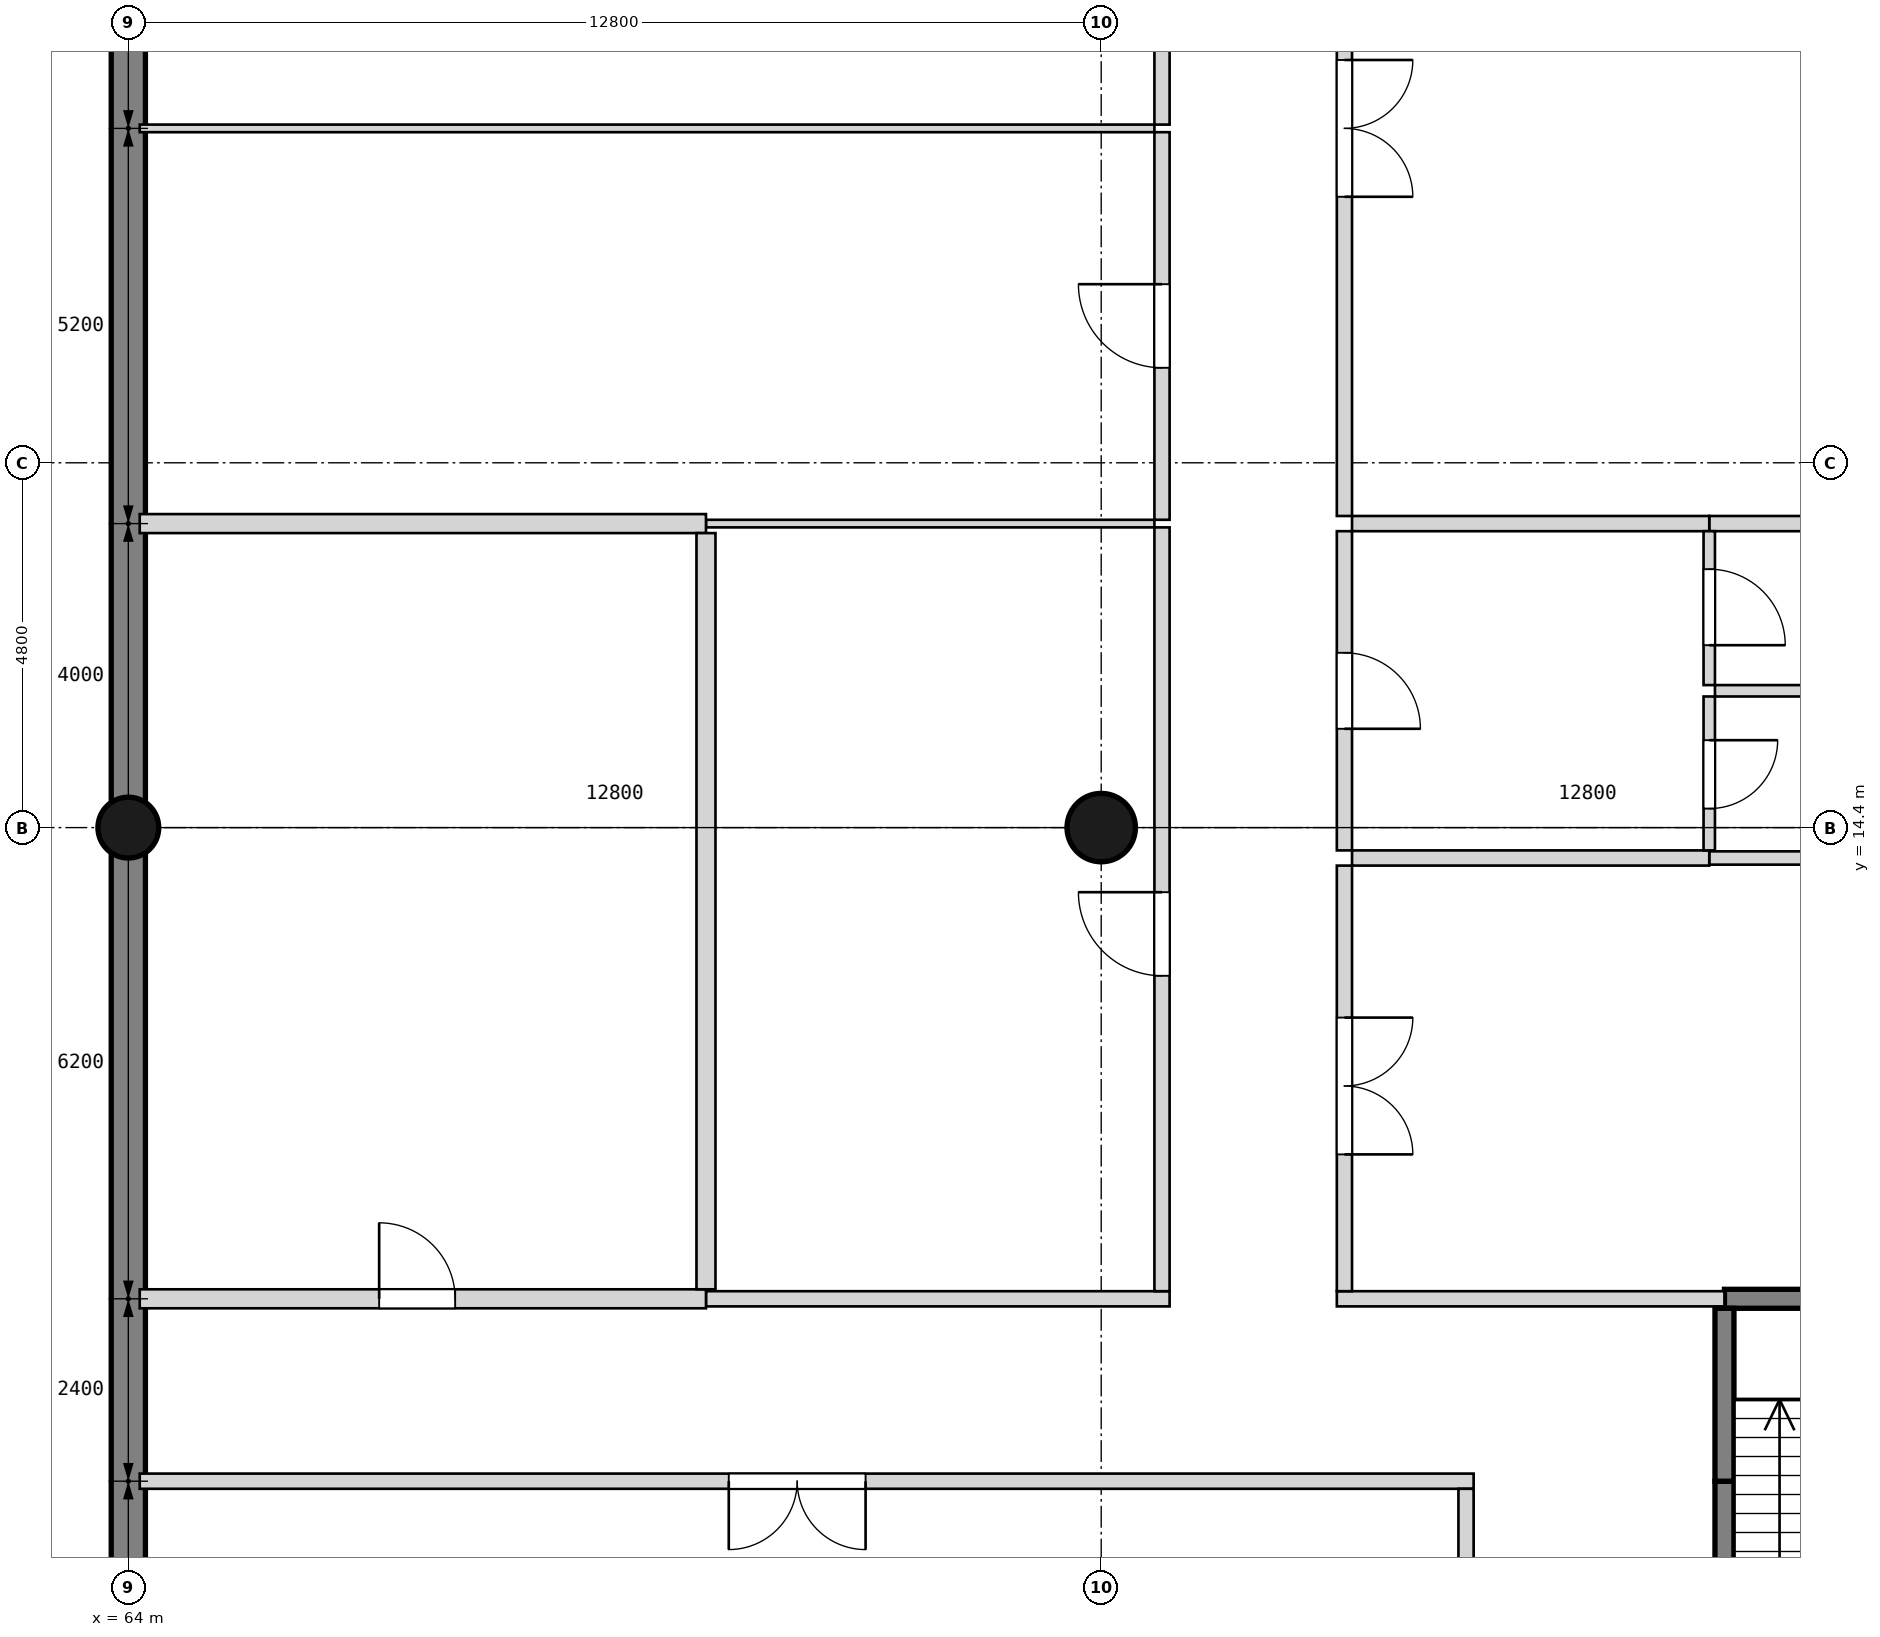
"""IFC4 building model, lengths in metres.
Left out: names, types, materials, properties, quantities, classifications, styles, units other than length and angle.
Written with IfcOpenShell. Run it as: python <this file> out.ifc"""

import sys

from ifc_helpers import new_model, si_unit, direction, frame, frame_2d, origin, origin_2d, place, context, subcontext, project, spatial, rectangle, circle, extrude, element, fill, save


model = new_model("IFC4")
c1 = context("Model", 3, precision=1e-05, world=origin(), true_north=direction((0.0, 1.0)))
c2 = subcontext(c1, "Body", "Model", "MODEL_VIEW")
j1 = project(units=[si_unit("LENGTHUNIT", "METRE"), si_unit("PLANEANGLEUNIT", "RADIAN")], contexts=[c1])
p1 = place(None, origin())
s1 = spatial("IfcSite", under=j1, at=p1, CompositionType="ELEMENT")
p2 = place(p1, origin())
s2 = spatial("IfcBuilding", under=s1, at=p2, CompositionType="ELEMENT")
p3 = place(p2, frame((0.0, 0.0, -4.8)))
s3 = spatial("IfcBuildingStorey", under=s2, at=p3, CompositionType="ELEMENT", Elevation=-4.8)
p4 = place(p3, frame((64.0, -0.225, 0.0), z_axis=(0.0, 0.0, 1.0), x_axis=(0.0, 1.0, 0.0)))
e1 = element("IfcWall", 1, at=p4, inside=s3, PredefinedType="SOLIDWALL", context=c2, shape_type="SweptSolid", body=[
    extrude(rectangle(XDim=33.6, YDim=0.45, at=frame_2d((16.8, 0.0))), origin(), (0.0, 0.0, 1.0), 4.8),
])
p5 = place(p3, frame((76.8, 14.4, 0.0), z_axis=(0.0, 0.0, 1.0), x_axis=(1.0, 0.0, 0.0)))
e2 = element("IfcColumn", 2, at=p5, inside=s3, PredefinedType="COLUMN", context=c2, shape_type="SweptSolid", body=[
    extrude(circle(Radius=0.45, at=origin_2d()), origin(), (0.0, 0.0, 1.0), 4.8),
])
p6 = place(p3, frame((64.0, 14.4, 0.0), z_axis=(0.0, 0.0, 1.0), x_axis=(1.0, 0.0, 0.0)))
e3 = element("IfcColumn", 3, at=p6, inside=s3, PredefinedType="COLUMN", context=c2, shape_type="SweptSolid", body=[
    extrude(circle(Radius=0.4, at=origin_2d()), origin(), (0.0, 0.0, 1.0), 4.8),
])
p7 = place(p3, frame((81.7, 5.8, 0.0), z_axis=(0.0, 0.0, 1.0), x_axis=(-1.0, 0.0, 0.0)))
e4 = element("IfcWall", 4, at=p7, inside=s3, PredefinedType="PARTITIONING", context=c2, shape_type="SweptSolid", body=[
    extrude(rectangle(XDim=17.55, YDim=0.2, at=frame_2d((8.775, 0.0))), origin(), (0.0, 0.0, 1.0), 4.5),
])
p8 = place(p7, frame((8.0, 0.0, 0.0)))
e5 = element("IfcOpeningElement", 5, at=p8, cuts=e4, PredefinedType="OPENING", context=c2, shape_type="SweptSolid", body=[
    extrude(rectangle(XDim=1.8, YDim=2.1, at=frame_2d((0.9, 1.05))), frame((0.0, 0.11, 0.0), z_axis=(0.0, -1.0, 0.0), x_axis=(1.0, 0.0, 0.0)), (0.0, 0.0, 1.0), 0.22),
])
p9 = place(p3, frame((88.6, 8.2, 0.0), z_axis=(0.0, 0.0, 1.0), x_axis=(-1.0, 0.0, 0.0)))
e6 = element("IfcWall", 6, at=p9, inside=s3, PredefinedType="SHEAR", context=c2, shape_type="SweptSolid", body=[
    extrude(rectangle(XDim=3.6, YDim=0.25, at=frame_2d((1.8, 0.0))), origin(), (0.0, 0.0, 1.0), 4.5),
])
p10 = place(p3, frame((85.0, 8.2, 0.0), z_axis=(0.0, 0.0, 1.0), x_axis=(-1.0, 0.0, 0.0)))
e7 = element("IfcWall", 7, at=p10, inside=s3, PredefinedType="PARTITIONING", context=c2, shape_type="SweptSolid", body=[
    extrude(rectangle(XDim=5.1, YDim=0.2, at=frame_2d((2.55, 0.0))), origin(), (0.0, 0.0, 1.0), 4.5),
])
p11 = place(p3, frame((77.7, 8.2, 0.0), z_axis=(0.0, 0.0, 1.0), x_axis=(-1.0, 0.0, 0.0)))
e8 = element("IfcWall", 8, at=p11, inside=s3, PredefinedType="PARTITIONING", context=c2, shape_type="SweptSolid", body=[
    extrude(rectangle(XDim=6.1, YDim=0.2, at=frame_2d((3.05, 0.0))), origin(), (0.0, 0.0, 1.0), 4.5),
])
p12 = place(p3, frame((71.6, 8.2, 0.0), z_axis=(0.0, 0.0, 1.0), x_axis=(-1.0, 0.0, 0.0)))
e9 = element("IfcWall", 9, at=p12, inside=s3, PredefinedType="PARTITIONING", context=c2, shape_type="SweptSolid", body=[
    extrude(rectangle(XDim=7.45, YDim=0.25, at=frame_2d((3.725, 0.0))), origin(), (0.0, 0.0, 1.0), 4.5),
])
p13 = place(p12, frame((3.3, 0.0, 0.0)))
e10 = element("IfcOpeningElement", 10, at=p13, cuts=e9, PredefinedType="OPENING", context=c2, shape_type="SweptSolid", body=[
    extrude(rectangle(XDim=1.0, YDim=2.1, at=frame_2d((0.5, 1.05))), frame((0.0, 0.135, 0.0), z_axis=(0.0, -1.0, 0.0), x_axis=(1.0, 0.0, 0.0)), (0.0, 0.0, 1.0), 0.27),
])
p14 = place(p3, frame((89.38, 14.0, 0.0), z_axis=(0.0, 0.0, 1.0), x_axis=(-1.0, 0.0, 0.0)))
e11 = element("IfcWall", 11, at=p14, inside=s3, PredefinedType="PARTITIONING", context=c2, shape_type="SweptSolid", body=[
    extrude(rectangle(XDim=4.58, YDim=0.175, at=frame_2d((2.29, 0.0))), origin(), (0.0, 0.0, 1.0), 4.5),
])
p15 = place(p3, frame((84.8, 14.0, 0.0), z_axis=(0.0, 0.0, 1.0), x_axis=(-1.0, 0.0, 0.0)))
e12 = element("IfcWall", 12, at=p15, inside=s3, PredefinedType="PARTITIONING", context=c2, shape_type="SweptSolid", body=[
    extrude(rectangle(XDim=4.7, YDim=0.2, at=frame_2d((2.35, 0.0))), origin(), (0.0, 0.0, 1.0), 4.5),
])
p16 = place(p3, frame((89.45, 16.2, 0.0), z_axis=(0.0, 0.0, 1.0), x_axis=(-1.0, 0.0, 0.0)))
e13 = element("IfcWall", 13, at=p16, inside=s3, PredefinedType="PARTITIONING", context=c2, shape_type="SweptSolid", body=[
    extrude(rectangle(XDim=4.575, YDim=0.15, at=frame_2d((2.288, 0.0))), origin(), (0.0, 0.0, 1.0), 4.5),
])
p17 = place(p3, frame((89.45, 18.4, 0.0), z_axis=(0.0, 0.0, 1.0), x_axis=(-1.0, 0.0, 0.0)))
e14 = element("IfcWall", 14, at=p17, inside=s3, PredefinedType="PARTITIONING", context=c2, shape_type="SweptSolid", body=[
    extrude(rectangle(XDim=4.65, YDim=0.2, at=frame_2d((2.325, 0.0))), origin(), (0.0, 0.0, 1.0), 4.5),
])
p18 = place(p3, frame((84.8, 18.4, 0.0), z_axis=(0.0, 0.0, 1.0), x_axis=(-1.0, 0.0, 0.0)))
e15 = element("IfcWall", 15, at=p18, inside=s3, PredefinedType="PARTITIONING", context=c2, shape_type="SweptSolid", body=[
    extrude(rectangle(XDim=4.7, YDim=0.2, at=frame_2d((2.35, 0.0))), origin(), (0.0, 0.0, 1.0), 4.5),
])
p19 = place(p3, frame((77.5, 18.4, 0.0), z_axis=(0.0, 0.0, 1.0), x_axis=(-1.0, 0.0, 0.0)))
e16 = element("IfcWall", 16, at=p19, inside=s3, PredefinedType="PARTITIONING", context=c2, shape_type="SweptSolid", body=[
    extrude(rectangle(XDim=5.9, YDim=0.1, at=frame_2d((2.95, 0.0))), origin(), (0.0, 0.0, 1.0), 4.5),
])
p20 = place(p3, frame((71.6, 18.4, 0.0), z_axis=(0.0, 0.0, 1.0), x_axis=(-1.0, 0.0, 0.0)))
e17 = element("IfcWall", 17, at=p20, inside=s3, PredefinedType="PARTITIONING", context=c2, shape_type="SweptSolid", body=[
    extrude(rectangle(XDim=7.45, YDim=0.25, at=frame_2d((3.725, 0.0))), origin(), (0.0, 0.0, 1.0), 4.5),
])
p21 = place(p3, frame((77.5, 23.6, 0.0), z_axis=(0.0, 0.0, 1.0), x_axis=(-1.0, 0.0, 0.0)))
e18 = element("IfcWall", 18, at=p21, inside=s3, PredefinedType="PARTITIONING", context=c2, shape_type="SweptSolid", body=[
    extrude(rectangle(XDim=13.35, YDim=0.1, at=frame_2d((6.675, 0.0))), origin(), (0.0, 0.0, 1.0), 4.5),
])
p22 = place(p3, frame((85.0, 2.325, 0.0), z_axis=(0.0, 0.0, 1.0), x_axis=(0.0, 1.0, 0.0)))
e19 = element("IfcWall", 19, at=p22, inside=s3, PredefinedType="SHEAR", context=c2, shape_type="SweptSolid", body=[
    extrude(rectangle(XDim=3.475, YDim=0.25, at=frame_2d((1.738, 0.0))), origin(), (0.0, 0.0, 1.0), 4.5),
])
p23 = place(p22, frame((0.105, 0.0, 0.0)))
e20 = element("IfcOpeningElement", 20, at=p23, cuts=e19, PredefinedType="OPENING", context=c2, shape_type="SweptSolid", body=[
    extrude(rectangle(XDim=1.2, YDim=2.1, at=frame_2d((0.6, 1.05))), frame((0.0, 0.135, 0.0), z_axis=(0.0, -1.0, 0.0), x_axis=(1.0, 0.0, 0.0)), (0.0, 0.0, 1.0), 0.27),
])
p24 = place(p3, frame((85.0, 5.8, 0.0), z_axis=(0.0, 0.0, 1.0), x_axis=(0.0, 1.0, 0.0)))
e21 = element("IfcWall", 21, at=p24, inside=s3, PredefinedType="SHEAR", context=c2, shape_type="SweptSolid", body=[
    extrude(rectangle(XDim=2.275, YDim=0.25, at=frame_2d((1.137, 0.0))), origin(), (0.0, 0.0, 1.0), 4.5),
])
p25 = place(p3, frame((84.8, 14.1, 0.0), z_axis=(0.0, 0.0, 1.0), x_axis=(0.0, 1.0, 0.0)))
e22 = element("IfcWall", 22, at=p25, inside=s3, PredefinedType="PARTITIONING", context=c2, shape_type="SweptSolid", body=[
    extrude(rectangle(XDim=2.025, YDim=0.15, at=frame_2d((1.012, 0.0))), origin(), (0.0, 0.0, 1.0), 4.5),
])
p26 = place(p25, frame((0.55, 0.0, 0.0)))
e23 = element("IfcOpeningElement", 23, at=p26, cuts=e22, PredefinedType="OPENING", context=c2, shape_type="SweptSolid", body=[
    extrude(rectangle(XDim=0.9, YDim=2.1, at=frame_2d((0.45, 1.05))), frame((0.0, 0.085, 0.0), z_axis=(0.0, -1.0, 0.0), x_axis=(1.0, 0.0, 0.0)), (0.0, 0.0, 1.0), 0.17),
])
p27 = place(p3, frame((84.8, 16.275, 0.0), z_axis=(0.0, 0.0, 1.0), x_axis=(0.0, 1.0, 0.0)))
e24 = element("IfcWall", 24, at=p27, inside=s3, PredefinedType="PARTITIONING", context=c2, shape_type="SweptSolid", body=[
    extrude(rectangle(XDim=2.025, YDim=0.15, at=frame_2d((1.013, 0.0))), origin(), (0.0, 0.0, 1.0), 4.5),
])
p28 = place(p27, frame((0.525, 0.0, 0.0)))
e25 = element("IfcOpeningElement", 25, at=p28, cuts=e24, PredefinedType="OPENING", context=c2, shape_type="SweptSolid", body=[
    extrude(rectangle(XDim=1.0, YDim=2.1, at=frame_2d((0.5, 1.05))), frame((0.0, 0.085, 0.0), z_axis=(0.0, -1.0, 0.0), x_axis=(1.0, 0.0, 0.0)), (0.0, 0.0, 1.0), 0.17),
])
p29 = place(p3, frame((81.6, 0.15, 0.0), z_axis=(0.0, 0.0, 1.0), x_axis=(0.0, 1.0, 0.0)))
e26 = element("IfcWall", 26, at=p29, inside=s3, PredefinedType="PARTITIONING", context=c2, shape_type="SweptSolid", body=[
    extrude(rectangle(XDim=5.55, YDim=0.2, at=frame_2d((2.775, 0.0))), origin(), (0.0, 0.0, 1.0), 4.5),
])
p30 = place(p3, frame((80.0, 8.3, 0.0), z_axis=(0.0, 0.0, 1.0), x_axis=(0.0, 1.0, 0.0)))
e27 = element("IfcWall", 27, at=p30, inside=s3, PredefinedType="PARTITIONING", context=c2, shape_type="SweptSolid", body=[
    extrude(rectangle(XDim=5.6, YDim=0.2, at=frame_2d((2.8, 0.0))), origin(), (0.0, 0.0, 1.0), 3.6),
])
p31 = place(p30, frame((1.8, 0.0, 0.0)))
e28 = element("IfcOpeningElement", 28, at=p31, cuts=e27, PredefinedType="OPENING", context=c2, shape_type="SweptSolid", body=[
    extrude(rectangle(XDim=1.8, YDim=2.1, at=frame_2d((0.9, 1.05))), frame((0.0, 0.11, 0.0), z_axis=(0.0, -1.0, 0.0), x_axis=(1.0, 0.0, 0.0)), (0.0, 0.0, 1.0), 0.22),
])
p32 = place(p3, frame((80.0, 14.1, 0.0), z_axis=(0.0, 0.0, 1.0), x_axis=(0.0, 1.0, 0.0)))
e29 = element("IfcWall", 29, at=p32, inside=s3, PredefinedType="PARTITIONING", context=c2, shape_type="SweptSolid", body=[
    extrude(rectangle(XDim=4.2, YDim=0.2, at=frame_2d((2.1, 0.0))), origin(), (0.0, 0.0, 1.0), 3.6),
])
p33 = place(p32, frame((1.6, 0.0, 0.0)))
e30 = element("IfcOpeningElement", 30, at=p33, cuts=e29, PredefinedType="OPENING", context=c2, shape_type="SweptSolid", body=[
    extrude(rectangle(XDim=1.0, YDim=2.1, at=frame_2d((0.5, 1.05))), frame((0.0, 0.11, 0.0), z_axis=(0.0, -1.0, 0.0), x_axis=(1.0, 0.0, 0.0)), (0.0, 0.0, 1.0), 0.22),
])
p34 = place(p3, frame((80.0, 18.5, 0.0), z_axis=(0.0, 0.0, 1.0), x_axis=(0.0, 1.0, 0.0)))
e31 = element("IfcWall", 31, at=p34, inside=s3, PredefinedType="PARTITIONING", context=c2, shape_type="SweptSolid", body=[
    extrude(rectangle(XDim=10.2, YDim=0.2, at=frame_2d((5.1, 0.0))), origin(), (0.0, 0.0, 1.0), 3.6),
])
p35 = place(p34, frame((4.2, 0.0, 0.0)))
e32 = element("IfcOpeningElement", 32, at=p35, cuts=e31, PredefinedType="OPENING", context=c2, shape_type="SweptSolid", body=[
    extrude(rectangle(XDim=1.8, YDim=2.1, at=frame_2d((0.9, 1.05))), frame((0.0, 0.11, 0.0), z_axis=(0.0, -1.0, 0.0), x_axis=(1.0, 0.0, 0.0)), (0.0, 0.0, 1.0), 0.22),
])
p36 = place(p3, frame((77.6, 8.3, 0.0), z_axis=(0.0, 0.0, 1.0), x_axis=(0.0, 1.0, 0.0)))
e33 = element("IfcWall", 33, at=p36, inside=s3, PredefinedType="PARTITIONING", context=c2, shape_type="SweptSolid", body=[
    extrude(rectangle(XDim=10.05, YDim=0.2, at=frame_2d((5.025, 0.0))), origin(), (0.0, 0.0, 1.0), 4.5),
])
p37 = place(p36, frame((4.15, 0.0, 0.0)))
e34 = element("IfcOpeningElement", 34, at=p37, cuts=e33, PredefinedType="OPENING", context=c2, shape_type="SweptSolid", body=[
    extrude(rectangle(XDim=1.1, YDim=2.1, at=frame_2d((0.55, 1.05))), frame((0.0, 0.11, 0.0), z_axis=(0.0, -1.0, 0.0), x_axis=(1.0, 0.0, 0.0)), (0.0, 0.0, 1.0), 0.22),
])
p38 = place(p3, frame((77.6, 18.45, 0.0), z_axis=(0.0, 0.0, 1.0), x_axis=(0.0, 1.0, 0.0)))
e35 = element("IfcWall", 35, at=p38, inside=s3, PredefinedType="PARTITIONING", context=c2, shape_type="SweptSolid", body=[
    extrude(rectangle(XDim=5.1, YDim=0.2, at=frame_2d((2.55, 0.0))), origin(), (0.0, 0.0, 1.0), 4.5),
])
p39 = place(p38, frame((2.0, 0.0, 0.0)))
e36 = element("IfcOpeningElement", 36, at=p39, cuts=e35, PredefinedType="OPENING", context=c2, shape_type="SweptSolid", body=[
    extrude(rectangle(XDim=1.1, YDim=2.1, at=frame_2d((0.55, 1.05))), frame((0.0, 0.11, 0.0), z_axis=(0.0, -1.0, 0.0), x_axis=(1.0, 0.0, 0.0)), (0.0, 0.0, 1.0), 0.22),
])
p40 = place(p3, frame((77.6, 23.65, 0.0), z_axis=(0.0, 0.0, 1.0), x_axis=(0.0, 1.0, 0.0)))
e37 = element("IfcWall", 37, at=p40, inside=s3, PredefinedType="PARTITIONING", context=c2, shape_type="SweptSolid", body=[
    extrude(rectangle(XDim=5.05, YDim=0.2, at=frame_2d((2.525, 0.0))), origin(), (0.0, 0.0, 1.0), 4.5),
])
p41 = place(p3, frame((71.6, 8.325, 0.0), z_axis=(0.0, 0.0, 1.0), x_axis=(0.0, 1.0, 0.0)))
e38 = element("IfcWall", 38, at=p41, inside=s3, PredefinedType="PARTITIONING", context=c2, shape_type="SweptSolid", body=[
    extrude(rectangle(XDim=9.95, YDim=0.25, at=frame_2d((4.975, 0.0))), origin(), (0.0, 0.0, 1.0), 4.5),
])
p42 = place(p8, origin())
e39 = element("IfcDoor", 39, at=p42, inside=s3, OperationType="DOUBLE_DOOR_SINGLE_SWING", PredefinedType="DOOR", context=c2, shape_type="SweptSolid", body=[
    extrude(rectangle(XDim=1.8, YDim=2.1, at=frame_2d((0.9, 1.05))), frame((0.0, 0.025, 0.0), z_axis=(0.0, -1.0, 0.0), x_axis=(1.0, 0.0, 0.0)), (0.0, 0.0, 1.0), 0.05),
])
fill(e5, e39)
p43 = place(p31, frame((1.8, 0.0, 0.0), z_axis=(0.0, 0.0, 1.0), x_axis=(-1.0, 0.0, 0.0)))
e40 = element("IfcDoor", 40, at=p43, inside=s3, OperationType="DOUBLE_DOOR_SINGLE_SWING", PredefinedType="DOOR", context=c2, shape_type="SweptSolid", body=[
    extrude(rectangle(XDim=1.8, YDim=2.1, at=frame_2d((0.9, 1.05))), frame((0.0, 0.025, 0.0), z_axis=(0.0, -1.0, 0.0), x_axis=(1.0, 0.0, 0.0)), (0.0, 0.0, 1.0), 0.05),
])
fill(e28, e40)
p44 = place(p33, frame((1.0, 0.0, 0.0), z_axis=(0.0, 0.0, 1.0), x_axis=(-1.0, 0.0, 0.0)))
e41 = element("IfcDoor", 41, at=p44, inside=s3, OperationType="SINGLE_SWING_RIGHT", PredefinedType="DOOR", context=c2, shape_type="SweptSolid", body=[
    extrude(rectangle(XDim=1.0, YDim=2.1, at=frame_2d((0.5, 1.05))), frame((0.0, 0.025, 0.0), z_axis=(0.0, -1.0, 0.0), x_axis=(1.0, 0.0, 0.0)), (0.0, 0.0, 1.0), 0.05),
])
fill(e30, e41)
p45 = place(p26, frame((0.9, 0.0, 0.0), z_axis=(0.0, 0.0, 1.0), x_axis=(-1.0, 0.0, 0.0)))
e42 = element("IfcDoor", 42, at=p45, inside=s3, OperationType="SINGLE_SWING_LEFT", PredefinedType="DOOR", context=c2, shape_type="SweptSolid", body=[
    extrude(rectangle(XDim=0.9, YDim=2.1, at=frame_2d((0.45, 1.05))), frame((0.0, 0.025, 0.0), z_axis=(0.0, -1.0, 0.0), x_axis=(1.0, 0.0, 0.0)), (0.0, 0.0, 1.0), 0.05),
])
fill(e23, e42)
p46 = place(p28, frame((1.0, 0.0, 0.0), z_axis=(0.0, 0.0, 1.0), x_axis=(-1.0, 0.0, 0.0)))
e43 = element("IfcDoor", 43, at=p46, inside=s3, OperationType="SINGLE_SWING_RIGHT", PredefinedType="DOOR", context=c2, shape_type="SweptSolid", body=[
    extrude(rectangle(XDim=1.0, YDim=2.1, at=frame_2d((0.5, 1.05))), frame((0.0, 0.025, 0.0), z_axis=(0.0, -1.0, 0.0), x_axis=(1.0, 0.0, 0.0)), (0.0, 0.0, 1.0), 0.05),
])
fill(e25, e43)
p47 = place(p37, origin())
e44 = element("IfcDoor", 44, at=p47, inside=s3, OperationType="SINGLE_SWING_RIGHT", PredefinedType="DOOR", context=c2, shape_type="SweptSolid", body=[
    extrude(rectangle(XDim=1.1, YDim=2.1, at=frame_2d((0.55, 1.05))), frame((0.0, 0.025, 0.0), z_axis=(0.0, -1.0, 0.0), x_axis=(1.0, 0.0, 0.0)), (0.0, 0.0, 1.0), 0.05),
])
fill(e34, e44)
p48 = place(p13, frame((1.0, 0.0, 0.0), z_axis=(0.0, 0.0, 1.0), x_axis=(-1.0, 0.0, 0.0)))
e45 = element("IfcDoor", 45, at=p48, inside=s3, OperationType="SINGLE_SWING_LEFT", PredefinedType="DOOR", context=c2, shape_type="SweptSolid", body=[
    extrude(rectangle(XDim=1.0, YDim=2.1, at=frame_2d((0.5, 1.05))), frame((0.0, 0.025, 0.0), z_axis=(0.0, -1.0, 0.0), x_axis=(1.0, 0.0, 0.0)), (0.0, 0.0, 1.0), 0.05),
])
fill(e10, e45)
p49 = place(p39, origin())
e46 = element("IfcDoor", 46, at=p49, inside=s3, OperationType="SINGLE_SWING_RIGHT", PredefinedType="DOOR", context=c2, shape_type="SweptSolid", body=[
    extrude(rectangle(XDim=1.1, YDim=2.1, at=frame_2d((0.55, 1.05))), frame((0.0, 0.025, 0.0), z_axis=(0.0, -1.0, 0.0), x_axis=(1.0, 0.0, 0.0)), (0.0, 0.0, 1.0), 0.05),
])
fill(e36, e46)
p50 = place(p35, frame((1.8, 0.0, 0.0), z_axis=(0.0, 0.0, 1.0), x_axis=(-1.0, 0.0, 0.0)))
e47 = element("IfcDoor", 47, at=p50, inside=s3, OperationType="DOUBLE_DOOR_SINGLE_SWING", PredefinedType="DOOR", context=c2, shape_type="SweptSolid", body=[
    extrude(rectangle(XDim=1.8, YDim=2.1, at=frame_2d((0.9, 1.05))), frame((0.0, 0.025, 0.0), z_axis=(0.0, -1.0, 0.0), x_axis=(1.0, 0.0, 0.0)), (0.0, 0.0, 1.0), 0.05),
])
fill(e32, e47)
save(model, sys.argv[1])
